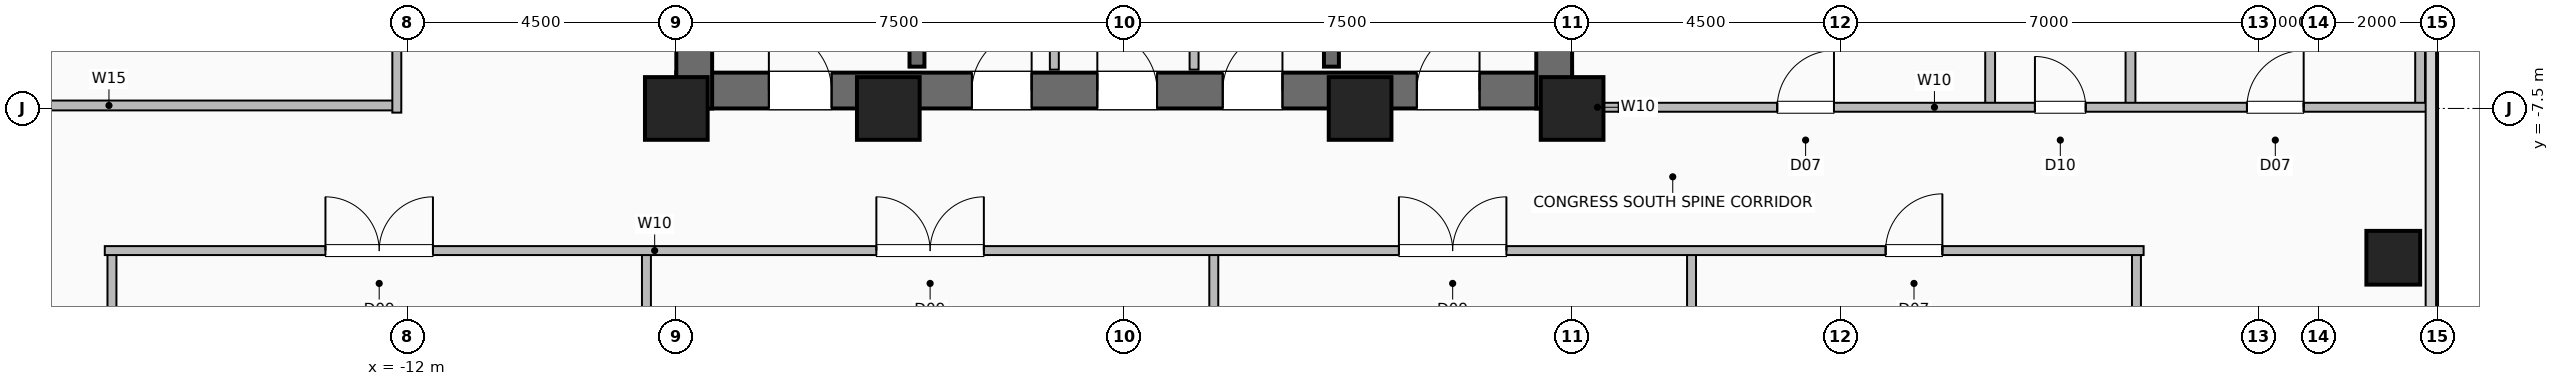
"""IFC4 building model, lengths in metres.
Left out: names, types, materials, properties, quantities, classifications, styles, units other than length and angle.
Written with IfcOpenShell. Run it as: python <this file> out.ifc"""

import sys

from ifc_helpers import new_model, si_unit, direction, frame, frame_2d, origin, origin_2d, place, context, subcontext, project, spatial, rectangle, hollow_rectangle, extrude, element, fill, save


model = new_model("IFC4")
c1 = context("Model", 3, precision=1e-05, world=origin(), true_north=direction((0.0, 1.0)))
c2 = subcontext(c1, "Body", "Model", "MODEL_VIEW")
j1 = project(units=[si_unit("LENGTHUNIT", "METRE"), si_unit("PLANEANGLEUNIT", "RADIAN")], contexts=[c1])
p1 = place(None, origin())
s1 = spatial("IfcSite", under=j1, at=p1, CompositionType="ELEMENT")
p2 = place(p1, origin())
s2 = spatial("IfcBuilding", under=s1, at=p2, CompositionType="ELEMENT")
p3 = place(p2, frame((0.0, 0.0, 130.0)))
s3 = spatial("IfcBuildingStorey", under=s2, at=p3, CompositionType="ELEMENT", Elevation=130.0)
for number, where, z_axis, x_axis in (
    (1, (-7.5, -7.5, 0.0), (0.0, 0.0, 1.0), (1.0, 0.0, 0.0)),
    (2, (-3.95, -7.5, 0.0), (0.0, 0.0, 1.0), (1.0, 0.0, 0.0)),
    (3, (3.95, -7.5, 0.0), (0.0, 0.0, 1.0), (1.0, 0.0, 0.0)),
    (4, (7.5, -7.5, 0.0), (0.0, 0.0, 1.0), (1.0, 0.0, 0.0)),
):
    element("IfcColumn", number, at=place(p3, frame(where, z_axis=z_axis, x_axis=x_axis)), inside=s3, PredefinedType="COLUMN", context=c2, shape_type="SweptSolid", body=[
        extrude(hollow_rectangle(XDim=1.05, YDim=1.05, WallThickness=0.05, at=origin_2d()), origin(), (0.0, 0.0, 1.0), 3.6),
    ])
p4 = place(p3, frame((21.25, -10.0, 0.0), z_axis=(0.0, 0.0, 1.0), x_axis=(1.0, 0.0, 0.0)))
e5 = element("IfcColumn", 5, at=p4, inside=s3, PredefinedType="COLUMN", context=c2, shape_type="SweptSolid", body=[
    extrude(hollow_rectangle(XDim=0.9, YDim=0.9, WallThickness=0.045, at=origin_2d()), origin(), (0.0, 0.0, 1.0), 3.6),
])
p5 = place(p3, frame((-7.5, -7.2, 0.0), z_axis=(0.0, 0.0, 1.0), x_axis=(1.0, 0.0, 0.0)))
e6 = element("IfcWall", 6, at=p5, inside=s3, PredefinedType="SHEAR", context=c2, shape_type="SweptSolid", body=[
    extrude(rectangle(XDim=15.0, YDim=0.6, at=frame_2d((7.5, 0.0))), origin(), (0.0, 0.0, 1.0), 3.36),
])
p6 = place(p5, frame((1.55, 0.0, 0.0)))
e7 = element("IfcOpeningElement", 7, at=p6, cuts=e6, PredefinedType="OPENING", context=c2, shape_type="SweptSolid", body=[
    extrude(rectangle(XDim=1.05, YDim=2.08, at=frame_2d((0.525, 1.04))), frame((0.0, 0.31, 0.0), z_axis=(0.0, -1.0, 0.0), x_axis=(1.0, 0.0, 0.0)), (0.0, 0.0, 1.0), 0.62),
])
p7 = place(p5, frame((12.4, 0.0, 0.0)))
e8 = element("IfcOpeningElement", 8, at=p7, cuts=e6, PredefinedType="OPENING", context=c2, shape_type="SweptSolid", body=[
    extrude(rectangle(XDim=1.05, YDim=2.08, at=frame_2d((0.525, 1.04))), frame((0.0, 0.31, 0.0), z_axis=(0.0, -1.0, 0.0), x_axis=(1.0, 0.0, 0.0)), (0.0, 0.0, 1.0), 0.62),
])
p8 = place(p5, frame((4.95, 0.0, 0.0)))
e9 = element("IfcOpeningElement", 9, at=p8, cuts=e6, PredefinedType="OPENING", context=c2, shape_type="SweptSolid", body=[
    extrude(rectangle(XDim=1.0, YDim=2.08, at=frame_2d((0.5, 1.04))), frame((0.0, 0.31, 0.0), z_axis=(0.0, -1.0, 0.0), x_axis=(1.0, 0.0, 0.0)), (0.0, 0.0, 1.0), 0.62),
])
p9 = place(p5, frame((7.05, 0.0, 0.0)))
e10 = element("IfcOpeningElement", 10, at=p9, cuts=e6, PredefinedType="OPENING", context=c2, shape_type="SweptSolid", body=[
    extrude(rectangle(XDim=1.0, YDim=2.08, at=frame_2d((0.5, 1.04))), frame((0.0, 0.31, 0.0), z_axis=(0.0, -1.0, 0.0), x_axis=(1.0, 0.0, 0.0)), (0.0, 0.0, 1.0), 0.62),
])
p10 = place(p5, frame((9.15, 0.0, 0.0)))
e11 = element("IfcOpeningElement", 11, at=p10, cuts=e6, PredefinedType="OPENING", context=c2, shape_type="SweptSolid", body=[
    extrude(rectangle(XDim=1.0, YDim=2.08, at=frame_2d((0.5, 1.04))), frame((0.0, 0.31, 0.0), z_axis=(0.0, -1.0, 0.0), x_axis=(1.0, 0.0, 0.0)), (0.0, 0.0, 1.0), 0.62),
])
p11 = place(p3, frame((-7.2, -7.5, 0.0), z_axis=(0.0, 0.0, 1.0), x_axis=(0.0, 1.0, 0.0)))
e12 = element("IfcWall", 12, at=p11, inside=s3, PredefinedType="SHEAR", context=c2, shape_type="SweptSolid", body=[
    extrude(rectangle(XDim=15.0, YDim=0.6, at=frame_2d((7.5, 0.0))), origin(), (0.0, 0.0, 1.0), 3.36),
])
p12 = place(p11, frame((9.5, 0.0, 0.0)))
e13 = element("IfcOpeningElement", 13, at=p12, cuts=e12, PredefinedType="OPENING", context=c2, shape_type="SweptSolid", body=[
    extrude(rectangle(XDim=1.0, YDim=2.08, at=frame_2d((0.5, 1.04))), frame((0.0, 0.31, 0.0), z_axis=(0.0, -1.0, 0.0), x_axis=(1.0, 0.0, 0.0)), (0.0, 0.0, 1.0), 0.62),
])
p13 = place(p3, frame((7.2, -7.5, 0.0), z_axis=(0.0, 0.0, 1.0), x_axis=(0.0, 1.0, 0.0)))
e14 = element("IfcWall", 14, at=p13, inside=s3, PredefinedType="SHEAR", context=c2, shape_type="SweptSolid", body=[
    extrude(rectangle(XDim=15.0, YDim=0.6, at=frame_2d((7.5, 0.0))), origin(), (0.0, 0.0, 1.0), 3.36),
])
for number, where, z_axis, x_axis in (
    (15, (-3.47, -6.8, 0.0), (0.0, 0.0, 1.0), (0.0, 1.0, 0.0)),
    (16, (3.47, -6.8, 0.0), (0.0, 0.0, 1.0), (0.0, 1.0, 0.0)),
):
    element("IfcWall", number, at=place(p3, frame(where, z_axis=z_axis, x_axis=x_axis)), inside=s3, PredefinedType="SHEAR", context=c2, shape_type="SweptSolid", body=[
        extrude(rectangle(XDim=7.72, YDim=0.25, at=frame_2d((3.86, 0.0))), origin(), (0.0, 0.0, 1.0), 3.36),
    ])
for number, where, z_axis, x_axis in (
    (17, (-1.17, -6.85, 0.0), (0.0, 0.0, 1.0), (0.0, 1.0, 0.0)),
    (18, (1.17, -6.85, 0.0), (0.0, 0.0, 1.0), (0.0, 1.0, 0.0)),
):
    element("IfcWall", number, at=place(p3, frame(where, z_axis=z_axis, x_axis=x_axis)), inside=s3, PredefinedType="PARTITIONING", context=c2, shape_type="SweptSolid", body=[
        extrude(rectangle(XDim=4.42, YDim=0.15, at=frame_2d((2.21, 0.0))), origin(), (0.0, 0.0, 1.0), 3.36),
    ])
for number, where, z_axis, x_axis in (
    (19, (-16.95, -21.82, 0.0), (0.0, 0.0, 1.0), (0.0, 1.0, 0.0)),
    (20, (-8.0, -21.82, 0.0), (0.0, 0.0, 1.0), (0.0, 1.0, 0.0)),
    (21, (1.5, -21.82, 0.0), (0.0, 0.0, 1.0), (0.0, 1.0, 0.0)),
    (22, (9.5, -21.82, 0.0), (0.0, 0.0, 1.0), (0.0, 1.0, 0.0)),
    (23, (16.95, -21.82, 0.0), (0.0, 0.0, 1.0), (0.0, 1.0, 0.0)),
):
    element("IfcWall", number, at=place(p3, frame(where, z_axis=z_axis, x_axis=x_axis)), inside=s3, PredefinedType="PARTITIONING", context=c2, shape_type="SweptSolid", body=[
        extrude(rectangle(XDim=11.94, YDim=0.15, at=frame_2d((5.97, 0.0))), origin(), (0.0, 0.0, 1.0), 3.36),
    ])
p14 = place(p3, frame((-17.07, -9.88, 0.0), z_axis=(0.0, 0.0, 1.0), x_axis=(1.0, 0.0, 0.0)))
e24 = element("IfcWall", 24, at=p14, inside=s3, PredefinedType="PARTITIONING", context=c2, shape_type="SweptSolid", body=[
    extrude(rectangle(XDim=34.14, YDim=0.15, at=frame_2d((17.07, 0.0))), origin(), (0.0, 0.0, 1.0), 3.36),
])
p15 = place(p14, frame((3.695, 0.0, 0.0)))
e25 = element("IfcOpeningElement", 25, at=p15, cuts=e24, PredefinedType="OPENING", context=c2, shape_type="SweptSolid", body=[
    extrude(rectangle(XDim=1.8, YDim=2.08, at=frame_2d((0.9, 1.04))), frame((0.0, 0.085, 0.0), z_axis=(0.0, -1.0, 0.0), x_axis=(1.0, 0.0, 0.0)), (0.0, 0.0, 1.0), 0.17),
])
p16 = place(p14, frame((12.92, 0.0, 0.0)))
e26 = element("IfcOpeningElement", 26, at=p16, cuts=e24, PredefinedType="OPENING", context=c2, shape_type="SweptSolid", body=[
    extrude(rectangle(XDim=1.8, YDim=2.08, at=frame_2d((0.9, 1.04))), frame((0.0, 0.085, 0.0), z_axis=(0.0, -1.0, 0.0), x_axis=(1.0, 0.0, 0.0)), (0.0, 0.0, 1.0), 0.17),
])
p17 = place(p14, frame((21.67, 0.0, 0.0)))
e27 = element("IfcOpeningElement", 27, at=p17, cuts=e24, PredefinedType="OPENING", context=c2, shape_type="SweptSolid", body=[
    extrude(rectangle(XDim=1.8, YDim=2.08, at=frame_2d((0.9, 1.04))), frame((0.0, 0.085, 0.0), z_axis=(0.0, -1.0, 0.0), x_axis=(1.0, 0.0, 0.0)), (0.0, 0.0, 1.0), 0.17),
])
p18 = place(p14, frame((29.82, 0.0, 0.0)))
e28 = element("IfcOpeningElement", 28, at=p18, cuts=e24, PredefinedType="OPENING", context=c2, shape_type="SweptSolid", body=[
    extrude(rectangle(XDim=0.95, YDim=2.06, at=frame_2d((0.475, 1.03))), frame((0.0, 0.085, 0.0), z_axis=(0.0, -1.0, 0.0), x_axis=(1.0, 0.0, 0.0)), (0.0, 0.0, 1.0), 0.17),
])
p19 = place(p3, frame((-21.82, -7.45, 0.0), z_axis=(0.0, 0.0, 1.0), x_axis=(1.0, 0.0, 0.0)))
e29 = element("IfcWall", 29, at=p19, inside=s3, PredefinedType="PLUMBINGWALL", context=c2, shape_type="SweptSolid", body=[
    extrude(rectangle(XDim=9.64, YDim=0.165, at=frame_2d((4.82, 0.0))), origin(), (0.0, 0.0, 1.0), 3.36),
])
p20 = place(p3, frame((-12.18, -7.57, 0.0), z_axis=(0.0, 0.0, 1.0), x_axis=(0.0, 1.0, 0.0)))
e30 = element("IfcWall", 30, at=p20, inside=s3, PredefinedType="PARTITIONING", context=c2, shape_type="SweptSolid", body=[
    extrude(rectangle(XDim=15.14, YDim=0.15, at=frame_2d((7.57, 0.0))), origin(), (0.0, 0.0, 1.0), 3.36),
])
p21 = place(p20, frame((2.27, 0.0, 0.0)))
e31 = element("IfcOpeningElement", 31, at=p21, cuts=e30, PredefinedType="OPENING", context=c2, shape_type="SweptSolid", body=[
    extrude(rectangle(XDim=0.95, YDim=2.06, at=frame_2d((0.475, 1.03))), frame((0.0, 0.085, 0.0), z_axis=(0.0, -1.0, 0.0), x_axis=(1.0, 0.0, 0.0)), (0.0, 0.0, 1.0), 0.17),
])
p22 = place(p20, frame((8.395, 0.0, 0.0)))
e32 = element("IfcOpeningElement", 32, at=p22, cuts=e30, PredefinedType="OPENING", context=c2, shape_type="SweptSolid", body=[
    extrude(rectangle(XDim=0.95, YDim=2.06, at=frame_2d((0.475, 1.03))), frame((0.0, 0.085, 0.0), z_axis=(0.0, -1.0, 0.0), x_axis=(1.0, 0.0, 0.0)), (0.0, 0.0, 1.0), 0.17),
])
p23 = place(p20, frame((13.27, 0.0, 0.0)))
e33 = element("IfcOpeningElement", 33, at=p23, cuts=e30, PredefinedType="OPENING", context=c2, shape_type="SweptSolid", body=[
    extrude(rectangle(XDim=0.85, YDim=2.05, at=frame_2d((0.425, 1.025))), frame((0.0, 0.085, 0.0), z_axis=(0.0, -1.0, 0.0), x_axis=(1.0, 0.0, 0.0)), (0.0, 0.0, 1.0), 0.17),
])
p24 = place(p3, frame((7.45, -7.48, 0.0), z_axis=(0.0, 0.0, 1.0), x_axis=(1.0, 0.0, 0.0)))
e34 = element("IfcWall", 34, at=p24, inside=s3, PredefinedType="PARTITIONING", context=c2, shape_type="SweptSolid", body=[
    extrude(rectangle(XDim=0.95, YDim=0.15, at=frame_2d((0.475, 0.0))), origin(), (0.0, 0.0, 1.0), 3.36),
])
for number, where, z_axis, x_axis in (
    (35, (16.85, -7.48, 0.0), (0.0, 0.0, 1.0), (0.0, 1.0, 0.0)),
    (36, (14.5, -7.48, 0.0), (0.0, 0.0, 1.0), (0.0, 1.0, 0.0)),
    (37, (21.7, -7.48, 0.0), (0.0, 0.0, 1.0), (0.0, 1.0, 0.0)),
):
    element("IfcWall", number, at=place(p3, frame(where, z_axis=z_axis, x_axis=x_axis)), inside=s3, PredefinedType="PLUMBINGWALL", context=c2, shape_type="SweptSolid", body=[
        extrude(rectangle(XDim=14.88, YDim=0.165, at=frame_2d((7.44, 0.0))), origin(), (0.0, 0.0, 1.0), 3.36),
    ])
p25 = place(p3, frame((8.28, -7.48, 0.0), z_axis=(0.0, 0.0, 1.0), x_axis=(1.0, 0.0, 0.0)))
e38 = element("IfcWall", 38, at=p25, inside=s3, PredefinedType="PARTITIONING", context=c2, shape_type="SweptSolid", body=[
    extrude(rectangle(XDim=13.54, YDim=0.15, at=frame_2d((6.77, 0.0))), origin(), (0.0, 0.0, 1.0), 3.36),
])
p26 = place(p25, frame((2.655, 0.0, 0.0)))
e39 = element("IfcOpeningElement", 39, at=p26, cuts=e38, PredefinedType="OPENING", context=c2, shape_type="SweptSolid", body=[
    extrude(rectangle(XDim=0.95, YDim=2.06, at=frame_2d((0.475, 1.03))), frame((0.0, 0.085, 0.0), z_axis=(0.0, -1.0, 0.0), x_axis=(1.0, 0.0, 0.0)), (0.0, 0.0, 1.0), 0.17),
])
p27 = place(p25, frame((6.97, 0.0, 0.0)))
e40 = element("IfcOpeningElement", 40, at=p27, cuts=e38, PredefinedType="OPENING", context=c2, shape_type="SweptSolid", body=[
    extrude(rectangle(XDim=0.85, YDim=2.05, at=frame_2d((0.425, 1.025))), frame((0.0, 0.085, 0.0), z_axis=(0.0, -1.0, 0.0), x_axis=(1.0, 0.0, 0.0)), (0.0, 0.0, 1.0), 0.17),
])
p28 = place(p25, frame((10.52, 0.0, 0.0)))
e41 = element("IfcOpeningElement", 41, at=p28, cuts=e38, PredefinedType="OPENING", context=c2, shape_type="SweptSolid", body=[
    extrude(rectangle(XDim=0.95, YDim=2.06, at=frame_2d((0.475, 1.03))), frame((0.0, 0.085, 0.0), z_axis=(0.0, -1.0, 0.0), x_axis=(1.0, 0.0, 0.0)), (0.0, 0.0, 1.0), 0.17),
])
p29 = place(p6, origin())
e42 = element("IfcDoor", 42, at=p29, inside=s3, OperationType="SINGLE_SWING_LEFT", PredefinedType="DOOR", context=c2, shape_type="SweptSolid", body=[
    extrude(rectangle(XDim=1.05, YDim=2.08, at=frame_2d((0.525, 1.04))), frame((0.0, 0.025, 0.0), z_axis=(0.0, -1.0, 0.0), x_axis=(1.0, 0.0, 0.0)), (0.0, 0.0, 1.0), 0.05),
])
fill(e7, e42)
p30 = place(p7, origin())
e43 = element("IfcDoor", 43, at=p30, inside=s3, OperationType="SINGLE_SWING_RIGHT", PredefinedType="DOOR", context=c2, shape_type="SweptSolid", body=[
    extrude(rectangle(XDim=1.05, YDim=2.08, at=frame_2d((0.525, 1.04))), frame((0.0, 0.025, 0.0), z_axis=(0.0, -1.0, 0.0), x_axis=(1.0, 0.0, 0.0)), (0.0, 0.0, 1.0), 0.05),
])
fill(e8, e43)
p31 = place(p8, origin())
e44 = element("IfcDoor", 44, at=p31, inside=s3, OperationType="SINGLE_SWING_RIGHT", PredefinedType="DOOR", context=c2, shape_type="SweptSolid", body=[
    extrude(rectangle(XDim=1.0, YDim=2.08, at=frame_2d((0.5, 1.04))), frame((0.0, 0.025, 0.0), z_axis=(0.0, -1.0, 0.0), x_axis=(1.0, 0.0, 0.0)), (0.0, 0.0, 1.0), 0.05),
])
fill(e9, e44)
p32 = place(p9, origin())
e45 = element("IfcDoor", 45, at=p32, inside=s3, OperationType="SINGLE_SWING_LEFT", PredefinedType="DOOR", context=c2, shape_type="SweptSolid", body=[
    extrude(rectangle(XDim=1.0, YDim=2.08, at=frame_2d((0.5, 1.04))), frame((0.0, 0.025, 0.0), z_axis=(0.0, -1.0, 0.0), x_axis=(1.0, 0.0, 0.0)), (0.0, 0.0, 1.0), 0.05),
])
fill(e10, e45)
p33 = place(p10, origin())
e46 = element("IfcDoor", 46, at=p33, inside=s3, OperationType="SINGLE_SWING_RIGHT", PredefinedType="DOOR", context=c2, shape_type="SweptSolid", body=[
    extrude(rectangle(XDim=1.0, YDim=2.08, at=frame_2d((0.5, 1.04))), frame((0.0, 0.025, 0.0), z_axis=(0.0, -1.0, 0.0), x_axis=(1.0, 0.0, 0.0)), (0.0, 0.0, 1.0), 0.05),
])
fill(e11, e46)
p34 = place(p15, origin())
e47 = element("IfcDoor", 47, at=p34, inside=s3, OperationType="DOUBLE_DOOR_SINGLE_SWING", PredefinedType="DOOR", context=c2, shape_type="SweptSolid", body=[
    extrude(rectangle(XDim=1.8, YDim=2.08, at=frame_2d((0.9, 1.04))), frame((0.0, 0.025, 0.0), z_axis=(0.0, -1.0, 0.0), x_axis=(1.0, 0.0, 0.0)), (0.0, 0.0, 1.0), 0.05),
])
fill(e25, e47)
p35 = place(p16, origin())
e48 = element("IfcDoor", 48, at=p35, inside=s3, OperationType="DOUBLE_DOOR_SINGLE_SWING", PredefinedType="DOOR", context=c2, shape_type="SweptSolid", body=[
    extrude(rectangle(XDim=1.8, YDim=2.08, at=frame_2d((0.9, 1.04))), frame((0.0, 0.025, 0.0), z_axis=(0.0, -1.0, 0.0), x_axis=(1.0, 0.0, 0.0)), (0.0, 0.0, 1.0), 0.05),
])
fill(e26, e48)
p36 = place(p17, origin())
e49 = element("IfcDoor", 49, at=p36, inside=s3, OperationType="DOUBLE_DOOR_SINGLE_SWING", PredefinedType="DOOR", context=c2, shape_type="SweptSolid", body=[
    extrude(rectangle(XDim=1.8, YDim=2.08, at=frame_2d((0.9, 1.04))), frame((0.0, 0.025, 0.0), z_axis=(0.0, -1.0, 0.0), x_axis=(1.0, 0.0, 0.0)), (0.0, 0.0, 1.0), 0.05),
])
fill(e27, e49)
p37 = place(p18, origin())
e50 = element("IfcDoor", 50, at=p37, inside=s3, OperationType="SINGLE_SWING_RIGHT", PredefinedType="DOOR", context=c2, shape_type="SweptSolid", body=[
    extrude(rectangle(XDim=0.95, YDim=2.06, at=frame_2d((0.475, 1.03))), frame((0.0, 0.025, 0.0), z_axis=(0.0, -1.0, 0.0), x_axis=(1.0, 0.0, 0.0)), (0.0, 0.0, 1.0), 0.05),
])
fill(e28, e50)
p38 = place(p26, origin())
e51 = element("IfcDoor", 51, at=p38, inside=s3, OperationType="SINGLE_SWING_RIGHT", PredefinedType="DOOR", context=c2, shape_type="SweptSolid", body=[
    extrude(rectangle(XDim=0.95, YDim=2.06, at=frame_2d((0.475, 1.03))), frame((0.0, 0.025, 0.0), z_axis=(0.0, -1.0, 0.0), x_axis=(1.0, 0.0, 0.0)), (0.0, 0.0, 1.0), 0.05),
])
fill(e39, e51)
p39 = place(p27, origin())
e52 = element("IfcDoor", 52, at=p39, inside=s3, OperationType="SINGLE_SWING_LEFT", PredefinedType="DOOR", context=c2, shape_type="SweptSolid", body=[
    extrude(rectangle(XDim=0.85, YDim=2.05, at=frame_2d((0.425, 1.025))), frame((0.0, 0.025, 0.0), z_axis=(0.0, -1.0, 0.0), x_axis=(1.0, 0.0, 0.0)), (0.0, 0.0, 1.0), 0.05),
])
fill(e40, e52)
p40 = place(p28, origin())
e53 = element("IfcDoor", 53, at=p40, inside=s3, OperationType="SINGLE_SWING_RIGHT", PredefinedType="DOOR", context=c2, shape_type="SweptSolid", body=[
    extrude(rectangle(XDim=0.95, YDim=2.06, at=frame_2d((0.475, 1.03))), frame((0.0, 0.025, 0.0), z_axis=(0.0, -1.0, 0.0), x_axis=(1.0, 0.0, 0.0)), (0.0, 0.0, 1.0), 0.05),
])
fill(e41, e53)
save(model, sys.argv[1])
